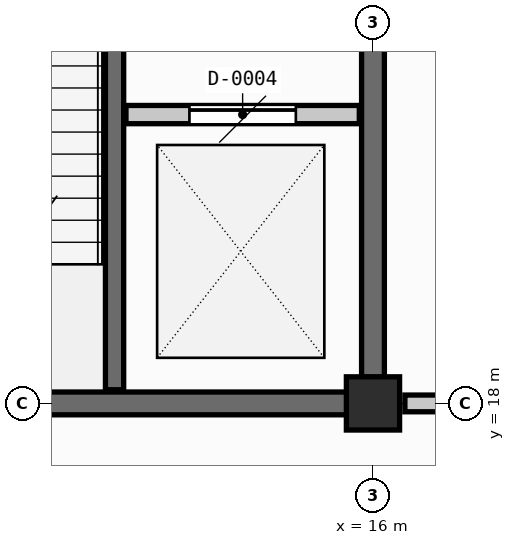
"""IFC4 building model, lengths in metres.
Left out: names, types, materials, properties, quantities, classifications, styles, units other than length and angle.
Written with IfcOpenShell. Run it as: python <this file> out.ifc"""

import sys

from ifc_helpers import new_model, si_unit, direction, frame, frame_2d, origin, origin_2d, place, context, subcontext, project, spatial, rectangle, extrude, element, fill, save


model = new_model("IFC4")
c1 = context("Model", 3, precision=1e-05, world=origin(), true_north=direction((0.0, 1.0)))
c2 = subcontext(c1, "Body", "Model", "MODEL_VIEW")
j1 = project(units=[si_unit("LENGTHUNIT", "METRE"), si_unit("PLANEANGLEUNIT", "RADIAN")], contexts=[c1])
p1 = place(None, origin())
s1 = spatial("IfcSite", under=j1, at=p1, CompositionType="ELEMENT")
p2 = place(p1, origin())
s2 = spatial("IfcBuilding", under=s1, at=p2, CompositionType="ELEMENT")
p3 = place(p2, origin())
s3 = spatial("IfcBuildingStorey", under=s2, at=p3, CompositionType="ELEMENT", Elevation=0.0)
p4 = place(p3, frame((16.0, 18.0, -1.25), z_axis=(0.0, 0.0, 1.0), x_axis=(1.0, 0.0, 0.0)))
e1 = element("IfcColumn", 1, at=p4, inside=s3, PredefinedType="COLUMN", context=c2, shape_type="SweptSolid", body=[
    extrude(rectangle(XDim=0.7, YDim=0.7, at=origin_2d()), origin(), (0.0, 0.0, 1.0), 6.05),
])
p5 = place(p3, frame((8.345, 18.0, -1.25), z_axis=(0.0, 0.0, 1.0), x_axis=(1.0, 0.0, 0.0)))
e2 = element("IfcWall", 2, at=p5, inside=s3, PredefinedType="SHEAR", context=c2, shape_type="SweptSolid", body=[
    extrude(rectangle(XDim=7.31, YDim=0.3, at=frame_2d((3.655, 0.0))), origin(), (0.0, 0.0, 1.0), 5.755),
])
p6 = place(p3, frame((16.0, 18.345, -1.25), z_axis=(0.0, 0.0, 1.0), x_axis=(0.0, 1.0, 0.0)))
e3 = element("IfcWall", 3, at=p6, inside=s3, PredefinedType="SHEAR", context=c2, shape_type="SweptSolid", body=[
    extrude(rectangle(XDim=8.31, YDim=0.3, at=frame_2d((4.155, 0.0))), origin(), (0.0, 0.0, 1.0), 5.755),
])
p7 = place(p6, frame((5.0, 0.0, 1.25)))
e4 = element("IfcOpeningElement", 4, at=p7, cuts=e3, PredefinedType="OPENING", context=c2, shape_type="SweptSolid", body=[
    extrude(rectangle(XDim=1.6, YDim=2.2, at=frame_2d((0.8, 1.1))), frame((0.0, 0.16, 0.0), z_axis=(0.0, -1.0, 0.0), x_axis=(1.0, 0.0, 0.0)), (0.0, 0.0, 1.0), 0.32),
])
p8 = place(p3, frame((12.6, 18.18, -1.25), z_axis=(0.0, 0.0, 1.0), x_axis=(0.0, 1.0, 0.0)))
e5 = element("IfcWall", 5, at=p8, inside=s3, PredefinedType="SHEAR", context=c2, shape_type="SweptSolid", body=[
    extrude(rectangle(XDim=8.64, YDim=0.24, at=frame_2d((4.32, 0.0))), origin(), (0.0, 0.0, 1.0), 5.755),
])
p9 = place(p8, frame((6.02, 0.0, 1.25)))
e6 = element("IfcOpeningElement", 6, at=p9, cuts=e5, PredefinedType="OPENING", context=c2, shape_type="SweptSolid", body=[
    extrude(rectangle(XDim=1.35, YDim=2.2, at=frame_2d((0.675, 1.1))), frame((0.0, 0.13, 0.0), z_axis=(0.0, -1.0, 0.0), x_axis=(1.0, 0.0, 0.0)), (0.0, 0.0, 1.0), 0.26),
])
p10 = place(p8, frame((7.68, 0.0, 1.25)))
e7 = element("IfcOpeningElement", 7, at=p10, cuts=e5, PredefinedType="OPENING", context=c2, shape_type="SweptSolid", body=[
    extrude(rectangle(XDim=0.9, YDim=2.05, at=frame_2d((0.45, 1.025))), frame((0.0, 0.13, 0.0), z_axis=(0.0, -1.0, 0.0), x_axis=(1.0, 0.0, 0.0)), (0.0, 0.0, 1.0), 0.26),
])
p11 = place(p3, frame((12.75, 21.8, 0.0), z_axis=(0.0, 0.0, 1.0), x_axis=(1.0, 0.0, 0.0)))
e8 = element("IfcWall", 8, at=p11, inside=s3, PredefinedType="SHEAR", context=c2, shape_type="SweptSolid", body=[
    extrude(rectangle(XDim=3.07, YDim=0.24, at=frame_2d((1.535, 0.0))), origin(), (0.0, 0.0, 1.0), 3.855),
])
p12 = place(p11, frame((0.835, 0.0, 0.0)))
e9 = element("IfcOpeningElement", 9, at=p12, cuts=e8, PredefinedType="OPENING", context=c2, shape_type="SweptSolid", body=[
    extrude(rectangle(XDim=1.4, YDim=2.3, at=frame_2d((0.7, 1.15))), frame((0.0, 0.13, 0.0), z_axis=(0.0, -1.0, 0.0), x_axis=(1.0, 0.0, 0.0)), (0.0, 0.0, 1.0), 0.26),
])
p13 = place(p3, frame((16.42, 18.0, 0.0), z_axis=(0.0, 0.0, 1.0), x_axis=(1.0, 0.0, 0.0)))
e10 = element("IfcWall", 10, at=p13, inside=s3, PredefinedType="SOLIDWALL", context=c2, shape_type="SweptSolid", body=[
    extrude(rectangle(XDim=7.16, YDim=0.22, at=frame_2d((3.58, 0.0))), origin(), (0.0, 0.0, 1.0), 3.55),
])
p14 = place(p13, frame((2.43, 0.0, 0.0)))
e11 = element("IfcOpeningElement", 11, at=p14, cuts=e10, PredefinedType="OPENING", context=c2, shape_type="SweptSolid", body=[
    extrude(rectangle(XDim=2.3, YDim=2.5, at=frame_2d((1.15, 1.25))), frame((0.0, 0.12, 0.0), z_axis=(0.0, -1.0, 0.0), x_axis=(1.0, 0.0, 0.0)), (0.0, 0.0, 1.0), 0.24),
])
p15 = place(p12, origin())
e12 = element("IfcDoor", 12, at=p15, inside=s3, OperationType="SLIDING_TO_LEFT", PredefinedType="DOOR", context=c2, shape_type="SweptSolid", body=[
    extrude(rectangle(XDim=1.4, YDim=2.3, at=frame_2d((0.7, 1.15))), frame((0.0, 0.025, 0.0), z_axis=(0.0, -1.0, 0.0), x_axis=(1.0, 0.0, 0.0)), (0.0, 0.0, 1.0), 0.05),
])
fill(e9, e12)
save(model, sys.argv[1])
